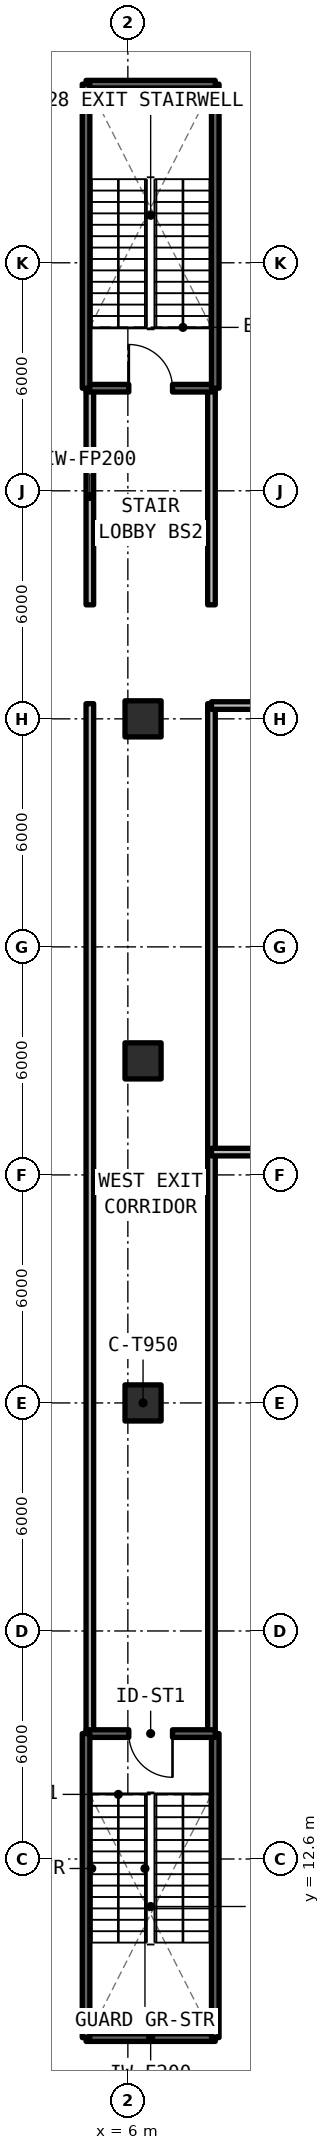
"""IFC4 building model, lengths in metres.
Left out: names, types, materials, properties, quantities, classifications, styles, units other than length and angle.
Written with IfcOpenShell. Run it as: python <this file> out.ifc"""

import sys

from ifc_helpers import new_model, si_unit, direction, frame, frame_2d, origin, origin_2d, place, context, subcontext, project, spatial, rectangle, extrude, element, fill, save


model = new_model("IFC4")
c1 = context("Model", 3, precision=1e-05, world=origin(), true_north=direction((0.0, 1.0)))
c2 = subcontext(c1, "Body", "Model", "MODEL_VIEW")
j1 = project(units=[si_unit("LENGTHUNIT", "METRE"), si_unit("PLANEANGLEUNIT", "RADIAN")], contexts=[c1])
p1 = place(None, origin())
s1 = spatial("IfcSite", under=j1, at=p1, CompositionType="ELEMENT")
p2 = place(p1, origin())
s2 = spatial("IfcBuilding", under=s1, at=p2, CompositionType="ELEMENT")
p3 = place(p2, frame((0.0, 0.0, -4.62)))
s3 = spatial("IfcBuildingStorey", under=s2, at=p3, CompositionType="ELEMENT", Elevation=-4.62)
for number, where, z_axis, x_axis in (
    (1, (6.4, 24.6, 0.0), (0.0, 0.0, 1.0), (1.0, 0.0, 0.0)),
    (2, (6.4, 42.6, 0.0), (0.0, 0.0, 1.0), (1.0, 0.0, 0.0)),
    (3, (6.4, 33.6, 0.0), (0.0, 0.0, 1.0), (1.0, 0.0, 0.0)),
):
    element("IfcColumn", number, at=place(p3, frame(where, z_axis=z_axis, x_axis=x_axis)), inside=s3, PredefinedType="COLUMN", context=c2, shape_type="SweptSolid", body=[
        extrude(rectangle(XDim=0.95, YDim=0.95, at=origin_2d()), origin(), (0.0, 0.0, 1.0), 4.34),
    ])
for number, where, z_axis, x_axis in (
    (4, (5.0, 45.6, 0.0), (0.0, 0.0, 1.0), (0.0, 1.0, 0.0)),
    (5, (8.2, 45.6, 0.0), (0.0, 0.0, 1.0), (0.0, 1.0, 0.0)),
):
    element("IfcWall", number, at=place(p3, frame(where, z_axis=z_axis, x_axis=x_axis)), inside=s3, PredefinedType="SOLIDWALL", context=c2, shape_type="SweptSolid", body=[
        extrude(rectangle(XDim=5.7, YDim=0.2, at=frame_2d((2.85, 0.0))), origin(), (0.0, 0.0, 1.0), 3.56),
    ])
for number, where, z_axis, x_axis in (
    (6, (5.0, 15.9, 0.0), (0.0, 0.0, 1.0), (0.0, 1.0, 0.0)),
    (7, (8.2, 15.9, 0.0), (0.0, 0.0, 1.0), (0.0, 1.0, 0.0)),
):
    element("IfcWall", number, at=place(p3, frame(where, z_axis=z_axis, x_axis=x_axis)), inside=s3, PredefinedType="SOLIDWALL", context=c2, shape_type="SweptSolid", body=[
        extrude(rectangle(XDim=27.1, YDim=0.2, at=frame_2d((13.55, 0.0))), origin(), (0.0, 0.0, 1.0), 3.56),
    ])
p4 = place(p3, frame((8.2, 31.2, 0.0), z_axis=(0.0, 0.0, 1.0), x_axis=(1.0, 0.0, 0.0)))
e8 = element("IfcWall", 8, at=p4, inside=s3, PredefinedType="SOLIDWALL", context=c2, shape_type="SweptSolid", body=[
    extrude(rectangle(XDim=15.48, YDim=0.2, at=frame_2d((7.74, 0.0))), origin(), (0.0, 0.0, 1.0), 3.56),
])
p5 = place(p3, frame((8.2, 42.95, 0.0), z_axis=(0.0, 0.0, 1.0), x_axis=(1.0, 0.0, 0.0)))
e9 = element("IfcWall", 9, at=p5, inside=s3, PredefinedType="SOLIDWALL", context=c2, shape_type="SweptSolid", body=[
    extrude(rectangle(XDim=15.48, YDim=0.2, at=frame_2d((7.74, 0.0))), origin(), (0.0, 0.0, 1.0), 3.56),
])
p6 = place(p5, frame((7.19, 0.0, 0.0)))
e10 = element("IfcOpeningElement", 10, at=p6, cuts=e9, PredefinedType="OPENING", context=c2, shape_type="SweptSolid", body=[
    extrude(rectangle(XDim=1.1, YDim=2.15, at=frame_2d((0.55, 1.075))), frame((0.0, 0.11, 0.0), z_axis=(0.0, -1.0, 0.0), x_axis=(1.0, 0.0, 0.0)), (0.0, 0.0, 1.0), 0.22),
])
p7 = place(p3, frame((4.9, 7.9, 0.0), z_axis=(0.0, 0.0, 1.0), x_axis=(1.0, 0.0, 0.0)))
e11 = element("IfcWall", 11, at=p7, inside=s3, PredefinedType="SOLIDWALL", context=c2, shape_type="SweptSolid", body=[
    extrude(rectangle(XDim=3.4, YDim=0.2, at=frame_2d((1.7, 0.0))), origin(), (0.0, 0.0, 1.0), 4.62),
])
p8 = place(p3, frame((8.3, 7.9, 0.0), z_axis=(0.0, 0.0, 1.0), x_axis=(0.0, 1.0, 0.0)))
e12 = element("IfcWall", 12, at=p8, inside=s3, PredefinedType="SOLIDWALL", context=c2, shape_type="SweptSolid", body=[
    extrude(rectangle(XDim=8.0, YDim=0.2, at=frame_2d((4.0, 0.0))), origin(), (0.0, 0.0, 1.0), 4.62),
])
p9 = place(p3, frame((8.3, 15.9, 0.0), z_axis=(0.0, 0.0, 1.0), x_axis=(-1.0, 0.0, 0.0)))
e13 = element("IfcWall", 13, at=p9, inside=s3, PredefinedType="SOLIDWALL", context=c2, shape_type="SweptSolid", body=[
    extrude(rectangle(XDim=3.4, YDim=0.2, at=frame_2d((1.7, 0.0))), origin(), (0.0, 0.0, 1.0), 4.62),
])
p10 = place(p9, frame((1.125, 0.0, 0.0)))
e14 = element("IfcOpeningElement", 14, at=p10, cuts=e13, PredefinedType="OPENING", context=c2, shape_type="SweptSolid", body=[
    extrude(rectangle(XDim=1.15, YDim=2.15, at=frame_2d((0.575, 1.075))), frame((0.0, 0.11, 0.0), z_axis=(0.0, -1.0, 0.0), x_axis=(1.0, 0.0, 0.0)), (0.0, 0.0, 1.0), 0.22),
])
p11 = place(p3, frame((4.9, 15.9, 0.0), z_axis=(0.0, 0.0, 1.0), x_axis=(0.0, -1.0, 0.0)))
e15 = element("IfcWall", 15, at=p11, inside=s3, PredefinedType="SOLIDWALL", context=c2, shape_type="SweptSolid", body=[
    extrude(rectangle(XDim=8.0, YDim=0.2, at=frame_2d((4.0, 0.0))), origin(), (0.0, 0.0, 1.0), 4.62),
])
p12 = place(p3, frame((4.9, 51.3, 0.0), z_axis=(0.0, 0.0, 1.0), x_axis=(1.0, 0.0, 0.0)))
e16 = element("IfcWall", 16, at=p12, inside=s3, PredefinedType="SOLIDWALL", context=c2, shape_type="SweptSolid", body=[
    extrude(rectangle(XDim=3.4, YDim=0.2, at=frame_2d((1.7, 0.0))), origin(), (0.0, 0.0, 1.0), 4.62),
])
p13 = place(p12, frame((1.125, 0.0, 0.0)))
e17 = element("IfcOpeningElement", 17, at=p13, cuts=e16, PredefinedType="OPENING", context=c2, shape_type="SweptSolid", body=[
    extrude(rectangle(XDim=1.15, YDim=2.15, at=frame_2d((0.575, 1.075))), frame((0.0, 0.11, 0.0), z_axis=(0.0, -1.0, 0.0), x_axis=(1.0, 0.0, 0.0)), (0.0, 0.0, 1.0), 0.22),
])
p14 = place(p3, frame((8.3, 51.3, 0.0), z_axis=(0.0, 0.0, 1.0), x_axis=(0.0, 1.0, 0.0)))
e18 = element("IfcWall", 18, at=p14, inside=s3, PredefinedType="SOLIDWALL", context=c2, shape_type="SweptSolid", body=[
    extrude(rectangle(XDim=8.0, YDim=0.2, at=frame_2d((4.0, 0.0))), origin(), (0.0, 0.0, 1.0), 4.62),
])
p15 = place(p3, frame((8.3, 59.3, 0.0), z_axis=(0.0, 0.0, 1.0), x_axis=(-1.0, 0.0, 0.0)))
e19 = element("IfcWall", 19, at=p15, inside=s3, PredefinedType="SOLIDWALL", context=c2, shape_type="SweptSolid", body=[
    extrude(rectangle(XDim=3.4, YDim=0.2, at=frame_2d((1.7, 0.0))), origin(), (0.0, 0.0, 1.0), 4.62),
])
p16 = place(p3, frame((4.9, 59.3, 0.0), z_axis=(0.0, 0.0, 1.0), x_axis=(0.0, -1.0, 0.0)))
e20 = element("IfcWall", 20, at=p16, inside=s3, PredefinedType="SOLIDWALL", context=c2, shape_type="SweptSolid", body=[
    extrude(rectangle(XDim=8.0, YDim=0.2, at=frame_2d((4.0, 0.0))), origin(), (0.0, 0.0, 1.0), 4.62),
])
p17 = place(p10, origin())
e21 = element("IfcDoor", 21, at=p17, inside=s3, OperationType="SINGLE_SWING_RIGHT", PredefinedType="DOOR", context=c2, shape_type="SweptSolid", body=[
    extrude(rectangle(XDim=1.15, YDim=2.15, at=frame_2d((0.575, 1.075))), frame((0.0, 0.025, 0.0), z_axis=(0.0, -1.0, 0.0), x_axis=(1.0, 0.0, 0.0)), (0.0, 0.0, 1.0), 0.05),
])
fill(e14, e21)
p18 = place(p13, origin())
e22 = element("IfcDoor", 22, at=p18, inside=s3, OperationType="SINGLE_SWING_LEFT", PredefinedType="DOOR", context=c2, shape_type="SweptSolid", body=[
    extrude(rectangle(XDim=1.15, YDim=2.15, at=frame_2d((0.575, 1.075))), frame((0.0, 0.025, 0.0), z_axis=(0.0, -1.0, 0.0), x_axis=(1.0, 0.0, 0.0)), (0.0, 0.0, 1.0), 0.05),
])
fill(e17, e22)
save(model, sys.argv[1])
